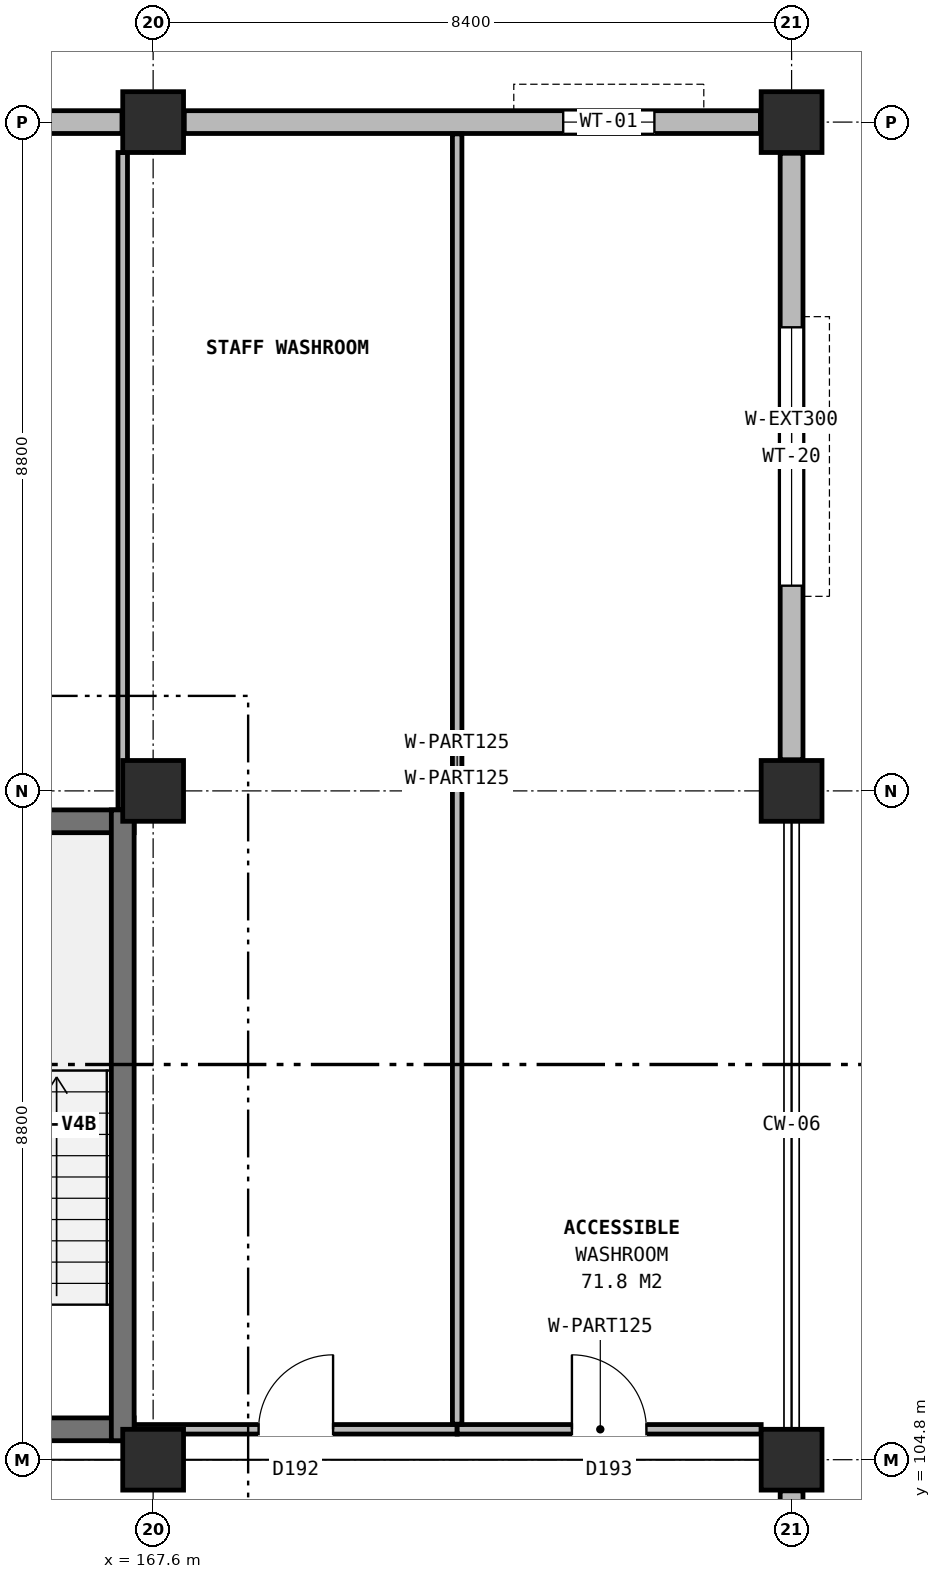
"""IFC4 building model, lengths in metres.
Left out: names, types, materials, properties, quantities, classifications, styles, units other than length and angle.
Written with IfcOpenShell. Run it as: python <this file> out.ifc"""

import sys

from ifc_helpers import new_model, si_unit, direction, frame, frame_2d, origin, origin_2d, place, context, subcontext, project, spatial, rectangle, extrude, element, fill, save


model = new_model("IFC4")
c1 = context("Model", 3, precision=1e-05, world=origin(), true_north=direction((0.0, 1.0)))
c2 = subcontext(c1, "Body", "Model", "MODEL_VIEW")
j1 = project(units=[si_unit("LENGTHUNIT", "METRE"), si_unit("PLANEANGLEUNIT", "RADIAN")], contexts=[c1])
p1 = place(None, origin())
s1 = spatial("IfcSite", under=j1, at=p1, CompositionType="ELEMENT")
p2 = place(p1, origin())
s2 = spatial("IfcBuilding", under=s1, at=p2, CompositionType="ELEMENT")
p3 = place(p2, frame((0.0, 0.0, 13.2)))
s3 = spatial("IfcBuildingStorey", under=s2, at=p3, CompositionType="ELEMENT", Elevation=13.2)
for number, where, z_axis, x_axis in (
    (1, (167.6, 104.8, 0.0), (0.0, 0.0, 1.0), (1.0, 0.0, 0.0)),
    (2, (167.6, 113.6, 0.0), (0.0, 0.0, 1.0), (1.0, 0.0, 0.0)),
    (3, (167.6, 122.4, 0.0), (0.0, 0.0, 1.0), (1.0, 0.0, 0.0)),
    (4, (176.0, 104.8, 0.0), (0.0, 0.0, 1.0), (1.0, 0.0, 0.0)),
    (5, (176.0, 113.6, 0.0), (0.0, 0.0, 1.0), (1.0, 0.0, 0.0)),
    (6, (176.0, 122.4, 0.0), (0.0, 0.0, 1.0), (1.0, 0.0, 0.0)),
):
    element("IfcColumn", number, at=place(p3, frame(where, z_axis=z_axis, x_axis=x_axis)), inside=s3, PredefinedType="COLUMN", context=c2, shape_type="SweptSolid", body=[
        extrude(rectangle(XDim=0.8, YDim=0.8, at=origin_2d()), origin(), (0.0, 0.0, 1.0), 4.0),
    ])
p4 = place(p3, frame((176.0, 96.41, 0.0), z_axis=(0.0, 0.0, 1.0), x_axis=(0.0, 1.0, 0.0)))
e7 = element("IfcWall", 7, at=p4, inside=s3, PredefinedType="SOLIDWALL", context=c2, shape_type="SweptSolid", body=[
    extrude(rectangle(XDim=7.98, YDim=0.3, at=frame_2d((3.99, 0.0))), origin(), (0.0, 0.0, 1.0), 3.25),
])
p5 = place(p4, frame((1.295, 0.0, 0.9)))
e8 = element("IfcOpeningElement", 8, at=p5, cuts=e7, PredefinedType="OPENING", context=c2, shape_type="SweptSolid", body=[
    extrude(rectangle(XDim=3.4, YDim=2.15, at=frame_2d((1.7, 1.075))), frame((0.0, 0.16, 0.0), z_axis=(0.0, -1.0, 0.0), x_axis=(1.0, 0.0, 0.0)), (0.0, 0.0, 1.0), 0.32),
])
p6 = place(p3, frame((176.0, 114.01, 0.0), z_axis=(0.0, 0.0, 1.0), x_axis=(0.0, 1.0, 0.0)))
e9 = element("IfcWall", 9, at=p6, inside=s3, PredefinedType="SOLIDWALL", context=c2, shape_type="SweptSolid", body=[
    extrude(rectangle(XDim=7.98, YDim=0.3, at=frame_2d((3.99, 0.0))), origin(), (0.0, 0.0, 1.0), 3.25),
])
p7 = place(p6, frame((2.29, 0.0, 0.9)))
e10 = element("IfcOpeningElement", 10, at=p7, cuts=e9, PredefinedType="OPENING", context=c2, shape_type="SweptSolid", body=[
    extrude(rectangle(XDim=3.4, YDim=2.15, at=frame_2d((1.7, 1.075))), frame((0.0, 0.16, 0.0), z_axis=(0.0, -1.0, 0.0), x_axis=(1.0, 0.0, 0.0)), (0.0, 0.0, 1.0), 0.32),
])
p8 = place(p3, frame((175.59, 122.4, 0.0), z_axis=(0.0, 0.0, 1.0), x_axis=(-1.0, 0.0, 0.0)))
e11 = element("IfcWall", 11, at=p8, inside=s3, PredefinedType="SOLIDWALL", context=c2, shape_type="SweptSolid", body=[
    extrude(rectangle(XDim=7.58, YDim=0.3, at=frame_2d((3.79, 0.0))), origin(), (0.0, 0.0, 1.0), 3.25),
])
p9 = place(p8, frame((1.395, 0.0, 0.9)))
e12 = element("IfcOpeningElement", 12, at=p9, cuts=e11, PredefinedType="OPENING", context=c2, shape_type="SweptSolid", body=[
    extrude(rectangle(XDim=1.2, YDim=1.8, at=frame_2d((0.6, 0.9))), frame((0.0, 0.16, 0.0), z_axis=(0.0, -1.0, 0.0), x_axis=(1.0, 0.0, 0.0)), (0.0, 0.0, 1.0), 0.32),
])
p10 = place(p3, frame((167.19, 122.4, 0.0), z_axis=(0.0, 0.0, 1.0), x_axis=(-1.0, 0.0, 0.0)))
e13 = element("IfcWall", 13, at=p10, inside=s3, PredefinedType="SOLIDWALL", context=c2, shape_type="SweptSolid", body=[
    extrude(rectangle(XDim=7.58, YDim=0.3, at=frame_2d((3.79, 0.0))), origin(), (0.0, 0.0, 1.0), 3.25),
])
p11 = place(p10, frame((3.115, 0.0, 0.9)))
e14 = element("IfcOpeningElement", 14, at=p11, cuts=e13, PredefinedType="OPENING", context=c2, shape_type="SweptSolid", body=[
    extrude(rectangle(XDim=1.35, YDim=1.8, at=frame_2d((0.675, 0.9))), frame((0.0, 0.16, 0.0), z_axis=(0.0, -1.0, 0.0), x_axis=(1.0, 0.0, 0.0)), (0.0, 0.0, 1.0), 0.32),
])
p12 = place(p3, frame((163.75, 105.2, 0.0), z_axis=(0.0, 0.0, 1.0), x_axis=(1.0, 0.0, 0.0)))
e15 = element("IfcWall", 15, at=p12, inside=s3, PredefinedType="SHEAR", context=c2, shape_type="SweptSolid", body=[
    extrude(rectangle(XDim=3.6, YDim=0.3, at=frame_2d((1.8, 0.0))), origin(), (0.0, 0.0, 1.0), 4.0),
])
p13 = place(p12, frame((1.05, 0.0, 0.0)))
e16 = element("IfcOpeningElement", 16, at=p13, cuts=e15, PredefinedType="OPENING", context=c2, shape_type="SweptSolid", body=[
    extrude(rectangle(XDim=1.1, YDim=2.2, at=frame_2d((0.55, 1.1))), frame((0.0, 0.16, 0.0), z_axis=(0.0, -1.0, 0.0), x_axis=(1.0, 0.0, 0.0)), (0.0, 0.0, 1.0), 0.32),
])
p14 = place(p3, frame((163.75, 113.2, 0.0), z_axis=(0.0, 0.0, 1.0), x_axis=(1.0, 0.0, 0.0)))
e17 = element("IfcWall", 17, at=p14, inside=s3, PredefinedType="SHEAR", context=c2, shape_type="SweptSolid", body=[
    extrude(rectangle(XDim=3.6, YDim=0.3, at=frame_2d((1.8, 0.0))), origin(), (0.0, 0.0, 1.0), 4.0),
])
p15 = place(p3, frame((167.2, 105.05, 0.0), z_axis=(0.0, 0.0, 1.0), x_axis=(0.0, 1.0, 0.0)))
e18 = element("IfcWall", 18, at=p15, inside=s3, PredefinedType="SHEAR", context=c2, shape_type="SweptSolid", body=[
    extrude(rectangle(XDim=8.3, YDim=0.3, at=frame_2d((4.15, 0.0))), origin(), (0.0, 0.0, 1.0), 4.0),
])
p16 = place(p3, frame((167.355, 105.2, 0.0), z_axis=(0.0, 0.0, 1.0), x_axis=(1.0, 0.0, 0.0)))
e19 = element("IfcWall", 19, at=p16, inside=s3, PredefinedType="PARTITIONING", context=c2, shape_type="SweptSolid", body=[
    extrude(rectangle(XDim=4.245, YDim=0.125, at=frame_2d((2.123, 0.0))), origin(), (0.0, 0.0, 1.0), 3.245),
])
p17 = place(p16, frame((1.633, 0.0, 0.0)))
e20 = element("IfcOpeningElement", 20, at=p17, cuts=e19, PredefinedType="OPENING", context=c2, shape_type="SweptSolid", body=[
    extrude(rectangle(XDim=0.98, YDim=2.1, at=frame_2d((0.49, 1.05))), frame((0.0, 0.073, 0.0), z_axis=(0.0, -1.0, 0.0), x_axis=(1.0, 0.0, 0.0)), (0.0, 0.0, 1.0), 0.145),
])
p18 = place(p3, frame((171.6, 105.2, 0.0), z_axis=(0.0, 0.0, 1.0), x_axis=(1.0, 0.0, 0.0)))
e21 = element("IfcWall", 21, at=p18, inside=s3, PredefinedType="PARTITIONING", context=c2, shape_type="SweptSolid", body=[
    extrude(rectangle(XDim=4.0, YDim=0.125, at=frame_2d((2.0, 0.0))), origin(), (0.0, 0.0, 1.0), 3.245),
])
p19 = place(p18, frame((1.51, 0.0, 0.0)))
e22 = element("IfcOpeningElement", 22, at=p19, cuts=e21, PredefinedType="OPENING", context=c2, shape_type="SweptSolid", body=[
    extrude(rectangle(XDim=0.98, YDim=2.1, at=frame_2d((0.49, 1.05))), frame((0.0, 0.073, 0.0), z_axis=(0.0, -1.0, 0.0), x_axis=(1.0, 0.0, 0.0)), (0.0, 0.0, 1.0), 0.145),
])
p20 = place(p3, frame((167.2, 113.355, 0.0), z_axis=(0.0, 0.0, 1.0), x_axis=(0.0, 1.0, 0.0)))
e23 = element("IfcWall", 23, at=p20, inside=s3, PredefinedType="PARTITIONING", context=c2, shape_type="SweptSolid", body=[
    extrude(rectangle(XDim=8.645, YDim=0.125, at=frame_2d((4.323, 0.0))), origin(), (0.0, 0.0, 1.0), 3.245),
])
p21 = place(p3, frame((171.6, 105.268, 0.0), z_axis=(0.0, 0.0, 1.0), x_axis=(0.0, 1.0, 0.0)))
e24 = element("IfcWall", 24, at=p21, inside=s3, PredefinedType="PARTITIONING", context=c2, shape_type="SweptSolid", body=[
    extrude(rectangle(XDim=16.978, YDim=0.125, at=frame_2d((8.489, 0.0))), origin(), (0.0, 0.0, 1.0), 3.665),
])
p22 = place(p7, origin())
e25 = element("IfcWindow", 25, at=p22, inside=s3, PartitioningType="SINGLE_PANEL", PredefinedType="WINDOW", context=c2, shape_type="SweptSolid", body=[
    extrude(rectangle(XDim=3.4, YDim=2.15, at=frame_2d((1.7, 1.075))), frame((0.0, 0.03, 0.0), z_axis=(0.0, -1.0, 0.0), x_axis=(1.0, 0.0, 0.0)), (0.0, 0.0, 1.0), 0.06),
])
fill(e10, e25)
p23 = place(p9, origin())
e26 = element("IfcWindow", 26, at=p23, inside=s3, PartitioningType="SINGLE_PANEL", PredefinedType="WINDOW", context=c2, shape_type="SweptSolid", body=[
    extrude(rectangle(XDim=1.2, YDim=1.8, at=frame_2d((0.6, 0.9))), frame((0.0, 0.03, 0.0), z_axis=(0.0, -1.0, 0.0), x_axis=(1.0, 0.0, 0.0)), (0.0, 0.0, 1.0), 0.06),
])
fill(e12, e26)
p24 = place(p17, origin())
e27 = element("IfcDoor", 27, at=p24, inside=s3, OperationType="SINGLE_SWING_RIGHT", PredefinedType="DOOR", context=c2, shape_type="SweptSolid", body=[
    extrude(rectangle(XDim=0.98, YDim=2.1, at=frame_2d((0.49, 1.05))), frame((0.0, 0.025, 0.0), z_axis=(0.0, -1.0, 0.0), x_axis=(1.0, 0.0, 0.0)), (0.0, 0.0, 1.0), 0.05),
])
fill(e20, e27)
p25 = place(p19, origin())
e28 = element("IfcDoor", 28, at=p25, inside=s3, OperationType="SINGLE_SWING_LEFT", PredefinedType="DOOR", context=c2, shape_type="SweptSolid", body=[
    extrude(rectangle(XDim=0.98, YDim=2.1, at=frame_2d((0.49, 1.05))), frame((0.0, 0.025, 0.0), z_axis=(0.0, -1.0, 0.0), x_axis=(1.0, 0.0, 0.0)), (0.0, 0.0, 1.0), 0.05),
])
fill(e22, e28)
save(model, sys.argv[1])
